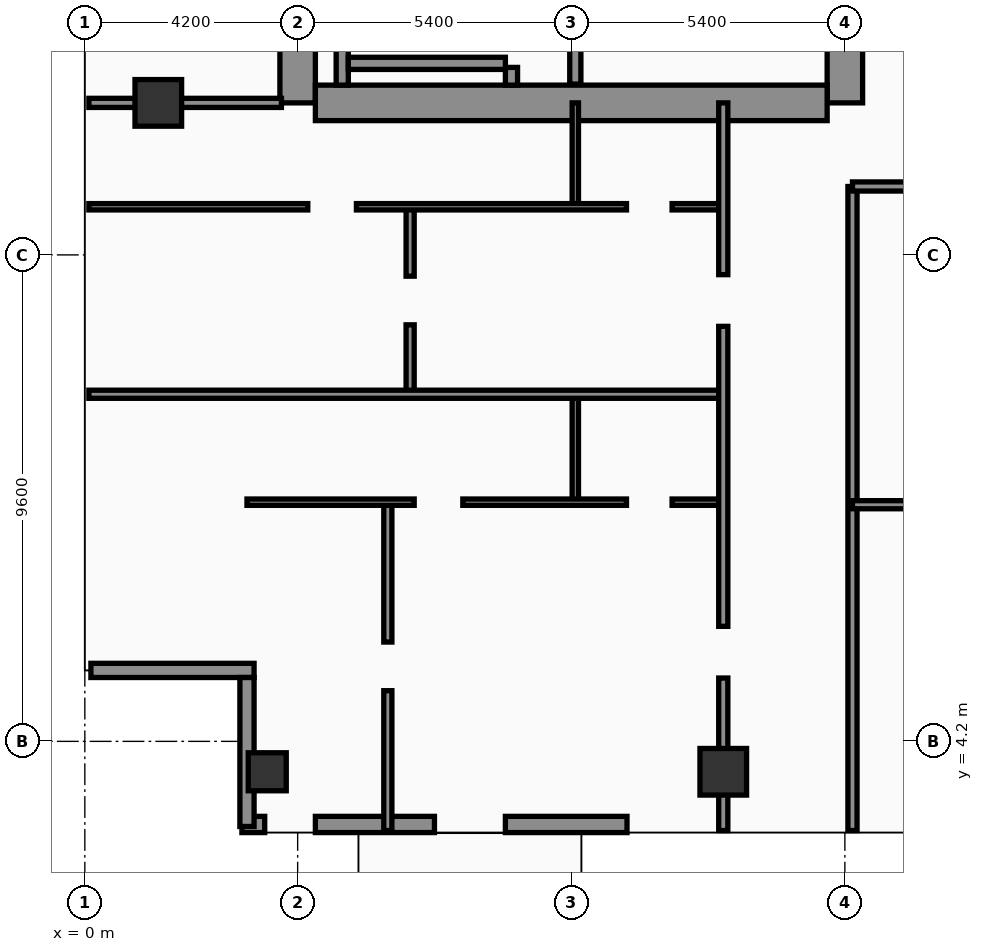
"""IFC4 building model, lengths in metres.
Left out: names, types, materials, properties, quantities, classifications, styles, units other than length and angle.
Written with IfcOpenShell. Run it as: python <this file> out.ifc"""

import sys

from ifc_helpers import new_model, si_unit, direction, frame, frame_2d, origin, origin_2d, place, context, subcontext, project, spatial, rectangle, hollow_rectangle, extrude, element, fill, save


model = new_model("IFC4")
c1 = context("Model", 3, precision=1e-05, world=origin(), true_north=direction((0.0, 1.0)))
c2 = subcontext(c1, "Body", "Model", "MODEL_VIEW")
j1 = project(units=[si_unit("LENGTHUNIT", "METRE"), si_unit("PLANEANGLEUNIT", "RADIAN")], contexts=[c1])
p1 = place(None, origin())
s1 = spatial("IfcSite", under=j1, at=p1, CompositionType="ELEMENT")
p2 = place(p1, origin())
s2 = spatial("IfcBuilding", under=s1, at=p2, CompositionType="ELEMENT")
p3 = place(p2, frame((0.0, 0.0, 211.0)))
s3 = spatial("IfcBuildingStorey", under=s2, at=p3, CompositionType="ELEMENT", Elevation=211.0)
p4 = place(p3, frame((4.2, 16.8, 0.0), z_axis=(0.0, 0.0, 1.0), x_axis=(0.0, 1.0, 0.0)))
e1 = element("IfcWall", 1, at=p4, inside=s3, PredefinedType="SHEAR", context=c2, shape_type="SweptSolid", body=[
    extrude(rectangle(XDim=21.6, YDim=0.7, at=frame_2d((10.8, 0.0))), origin(), (0.0, 0.0, 1.0), 3.56),
])
p5 = place(p3, frame((15.0, 16.8, 0.0), z_axis=(0.0, 0.0, 1.0), x_axis=(0.0, 1.0, 0.0)))
e2 = element("IfcWall", 2, at=p5, inside=s3, PredefinedType="SHEAR", context=c2, shape_type="SweptSolid", body=[
    extrude(rectangle(XDim=21.6, YDim=0.7, at=frame_2d((10.8, 0.0))), origin(), (0.0, 0.0, 1.0), 3.56),
])
p6 = place(p5, frame((8.65, 0.0, 0.0)))
e3 = element("IfcOpeningElement", 3, at=p6, cuts=e2, PredefinedType="OPENING", context=c2, shape_type="SweptSolid", body=[
    extrude(rectangle(XDim=1.1, YDim=2.2, at=frame_2d((0.55, 1.1))), frame((0.0, 0.36, 0.0), z_axis=(0.0, -1.0, 0.0), x_axis=(1.0, 0.0, 0.0)), (0.0, 0.0, 1.0), 0.72),
])
p7 = place(p5, frame((10.85, 0.0, 0.0)))
e4 = element("IfcOpeningElement", 4, at=p7, cuts=e2, PredefinedType="OPENING", context=c2, shape_type="SweptSolid", body=[
    extrude(rectangle(XDim=1.1, YDim=2.2, at=frame_2d((0.55, 1.1))), frame((0.0, 0.36, 0.0), z_axis=(0.0, -1.0, 0.0), x_axis=(1.0, 0.0, 0.0)), (0.0, 0.0, 1.0), 0.72),
])
p8 = place(p5, frame((13.5, 0.0, 0.0)))
e5 = element("IfcOpeningElement", 5, at=p8, cuts=e2, PredefinedType="OPENING", context=c2, shape_type="SweptSolid", body=[
    extrude(rectangle(XDim=1.1, YDim=2.2, at=frame_2d((0.55, 1.1))), frame((0.0, 0.36, 0.0), z_axis=(0.0, -1.0, 0.0), x_axis=(1.0, 0.0, 0.0)), (0.0, 0.0, 1.0), 0.72),
])
p9 = place(p5, frame((16.15, 0.0, 0.0)))
e6 = element("IfcOpeningElement", 6, at=p9, cuts=e2, PredefinedType="OPENING", context=c2, shape_type="SweptSolid", body=[
    extrude(rectangle(XDim=1.1, YDim=2.2, at=frame_2d((0.55, 1.1))), frame((0.0, 0.36, 0.0), z_axis=(0.0, -1.0, 0.0), x_axis=(1.0, 0.0, 0.0)), (0.0, 0.0, 1.0), 0.72),
])
p10 = place(p3, frame((4.55, 16.8, 0.0), z_axis=(0.0, 0.0, 1.0), x_axis=(1.0, 0.0, 0.0)))
e7 = element("IfcWall", 7, at=p10, inside=s3, PredefinedType="SHEAR", context=c2, shape_type="SweptSolid", body=[
    extrude(rectangle(XDim=10.1, YDim=0.7, at=frame_2d((5.05, 0.0))), origin(), (0.0, 0.0, 1.0), 3.56),
])
p11 = place(p3, frame((5.08, 17.15, 0.0), z_axis=(0.0, 0.0, 1.0), x_axis=(0.0, 1.0, 0.0)))
e8 = element("IfcWall", 8, at=p11, inside=s3, PredefinedType="SOLIDWALL", context=c2, shape_type="SweptSolid", body=[
    extrude(rectangle(XDim=9.64, YDim=0.24, at=frame_2d((4.82, 0.0))), origin(), (0.0, 0.0, 1.0), 3.56),
])
p12 = place(p3, frame((8.42, 17.15, 0.0), z_axis=(0.0, 0.0, 1.0), x_axis=(0.0, 1.0, 0.0)))
e9 = element("IfcWall", 9, at=p12, inside=s3, PredefinedType="SOLIDWALL", context=c2, shape_type="SweptSolid", body=[
    extrude(rectangle(XDim=9.64, YDim=0.24, at=frame_2d((4.82, 0.0))), origin(), (0.0, 0.0, 1.0), 3.56),
])
p13 = place(p12, frame((0.35, 0.0, 0.0)))
e10 = element("IfcOpeningElement", 10, at=p13, cuts=e9, PredefinedType="OPENING", context=c2, shape_type="SweptSolid", body=[
    extrude(rectangle(XDim=1.15, YDim=2.2, at=frame_2d((0.575, 1.1))), frame((0.0, 0.13, 0.0), z_axis=(0.0, -1.0, 0.0), x_axis=(1.0, 0.0, 0.0)), (0.0, 0.0, 1.0), 0.26),
])
p14 = place(p3, frame((5.2, 17.58, 0.0), z_axis=(0.0, 0.0, 1.0), x_axis=(1.0, 0.0, 0.0)))
e11 = element("IfcWall", 11, at=p14, inside=s3, PredefinedType="SOLIDWALL", context=c2, shape_type="SweptSolid", body=[
    extrude(rectangle(XDim=3.1, YDim=0.24, at=frame_2d((1.55, 0.0))), origin(), (0.0, 0.0, 1.0), 3.56),
])
p15 = place(p3, frame((3.6, 3.6, 0.0), z_axis=(0.0, 0.0, 1.0), x_axis=(1.0, 0.0, 0.0)))
e12 = element("IfcColumn", 12, at=p15, inside=s3, PredefinedType="COLUMN", context=c2, shape_type="SweptSolid", body=[
    extrude(hollow_rectangle(XDim=0.75, YDim=0.75, WallThickness=0.032, at=origin_2d()), origin(), (0.0, 0.0, 1.0), 3.56),
])
for number, where, z_axis, x_axis in (
    (13, (1.45, 16.8, 0.0), (0.0, 0.0, 1.0), (1.0, 0.0, 0.0)),
    (14, (12.6, 3.6, 0.0), (0.0, 0.0, 1.0), (1.0, 0.0, 0.0)),
):
    element("IfcColumn", number, at=place(p3, frame(where, z_axis=z_axis, x_axis=x_axis)), inside=s3, PredefinedType="COLUMN", context=c2, shape_type="SweptSolid", body=[
        extrude(rectangle(XDim=0.92, YDim=0.92, at=origin_2d()), origin(), (0.0, 0.0, 1.0), 3.56),
    ])
p16 = place(p3, frame((3.1, 2.56, 0.0), z_axis=(0.0, 0.0, 1.0), x_axis=(1.0, 0.0, 0.0)))
e15 = element("IfcWall", 15, at=p16, inside=s3, PredefinedType="SOLIDWALL", context=c2, shape_type="SweptSolid", body=[
    extrude(rectangle(XDim=7.6, YDim=0.32, at=frame_2d((3.8, 0.0))), origin(), (0.0, 0.0, 1.0), 3.56),
])
p17 = place(p16, frame((0.45, 0.0, 0.75)))
e16 = element("IfcOpeningElement", 16, at=p17, cuts=e15, PredefinedType="OPENING", context=c2, shape_type="SweptSolid", body=[
    extrude(rectangle(XDim=1.0, YDim=1.6, at=frame_2d((0.5, 0.8))), frame((0.0, 0.17, 0.0), z_axis=(0.0, -1.0, 0.0), x_axis=(1.0, 0.0, 0.0)), (0.0, 0.0, 1.0), 0.34),
])
p18 = place(p16, frame((3.8, 0.0, 0.0)))
e17 = element("IfcOpeningElement", 17, at=p18, cuts=e15, PredefinedType="OPENING", context=c2, shape_type="SweptSolid", body=[
    extrude(rectangle(XDim=1.4, YDim=2.25, at=frame_2d((0.7, 1.125))), frame((0.0, 0.17, 0.0), z_axis=(0.0, -1.0, 0.0), x_axis=(1.0, 0.0, 0.0)), (0.0, 0.0, 1.0), 0.34),
])
p19 = place(p3, frame((0.12, 5.6, 0.0), z_axis=(0.0, 0.0, 1.0), x_axis=(1.0, 0.0, 0.0)))
e18 = element("IfcWall", 18, at=p19, inside=s3, PredefinedType="SOLIDWALL", context=c2, shape_type="SweptSolid", body=[
    extrude(rectangle(XDim=3.22, YDim=0.28, at=frame_2d((1.61, 0.0))), origin(), (0.0, 0.0, 1.0), 2.94),
])
p20 = place(p3, frame((3.2, 5.46, 0.0), z_axis=(0.0, 0.0, 1.0), x_axis=(0.0, -1.0, 0.0)))
e19 = element("IfcWall", 19, at=p20, inside=s3, PredefinedType="SOLIDWALL", context=c2, shape_type="SweptSolid", body=[
    extrude(rectangle(XDim=2.94, YDim=0.28, at=frame_2d((1.47, 0.0))), origin(), (0.0, 0.0, 1.0), 2.94),
])
p21 = place(p3, frame((9.68, 17.17, 0.0), z_axis=(0.0, 0.0, 1.0), x_axis=(0.0, 1.0, 0.0)))
e20 = element("IfcWall", 20, at=p21, inside=s3, PredefinedType="SOLIDWALL", context=c2, shape_type="SweptSolid", body=[
    extrude(rectangle(XDim=7.83, YDim=0.22, at=frame_2d((3.915, 0.0))), origin(), (0.0, 0.0, 1.0), 3.56),
])
p22 = place(p3, frame((0.08, 16.8, 0.0), z_axis=(0.0, 0.0, 1.0), x_axis=(1.0, 0.0, 0.0)))
e21 = element("IfcWall", 21, at=p22, inside=s3, PredefinedType="PARTITIONING", context=c2, shape_type="SweptSolid", body=[
    extrude(rectangle(XDim=3.8, YDim=0.18, at=frame_2d((1.9, 0.0))), origin(), (0.0, 0.0, 1.0), 2.94),
])
p23 = place(p3, frame((9.68, 8.92, 0.0), z_axis=(0.0, 0.0, 1.0), x_axis=(0.0, 1.0, 0.0)))
e22 = element("IfcWall", 22, at=p23, inside=s3, PredefinedType="PARTITIONING", context=c2, shape_type="SweptSolid", body=[
    extrude(rectangle(XDim=2.13, YDim=0.125, at=frame_2d((1.065, 0.0))), origin(), (0.0, 0.0, 1.0), 3.09),
])
p24 = place(p3, frame((5.98, 2.44, 0.0), z_axis=(0.0, 0.0, 1.0), x_axis=(0.0, 1.0, 0.0)))
e23 = element("IfcWall", 23, at=p24, inside=s3, PredefinedType="PARTITIONING", context=c2, shape_type="SweptSolid", body=[
    extrude(rectangle(XDim=6.48, YDim=0.16, at=frame_2d((3.24, 0.0))), origin(), (0.0, 0.0, 1.0), 3.09),
])
p25 = place(p24, frame((2.76, 0.0, 0.0)))
e24 = element("IfcOpeningElement", 24, at=p25, cuts=e23, PredefinedType="OPENING", context=c2, shape_type="SweptSolid", body=[
    extrude(rectangle(XDim=0.96, YDim=2.2, at=frame_2d((0.48, 1.1))), frame((0.0, 0.09, 0.0), z_axis=(0.0, -1.0, 0.0), x_axis=(1.0, 0.0, 0.0)), (0.0, 0.0, 1.0), 0.18),
])
p26 = place(p3, frame((3.2, 8.92, 0.0), z_axis=(0.0, 0.0, 1.0), x_axis=(1.0, 0.0, 0.0)))
e25 = element("IfcWall", 25, at=p26, inside=s3, PredefinedType="PARTITIONING", context=c2, shape_type="SweptSolid", body=[
    extrude(rectangle(XDim=9.4, YDim=0.125, at=frame_2d((4.7, 0.0))), origin(), (0.0, 0.0, 1.0), 2.94),
])
p27 = place(p26, frame((3.3, 0.0, 0.0)))
e26 = element("IfcOpeningElement", 26, at=p27, cuts=e25, PredefinedType="OPENING", context=c2, shape_type="SweptSolid", body=[
    extrude(rectangle(XDim=0.96, YDim=2.2, at=frame_2d((0.48, 1.1))), frame((0.0, 0.073, 0.0), z_axis=(0.0, -1.0, 0.0), x_axis=(1.0, 0.0, 0.0)), (0.0, 0.0, 1.0), 0.145),
])
p28 = place(p26, frame((7.49, 0.0, 0.0)))
e27 = element("IfcOpeningElement", 27, at=p28, cuts=e25, PredefinedType="OPENING", context=c2, shape_type="SweptSolid", body=[
    extrude(rectangle(XDim=0.9, YDim=2.15, at=frame_2d((0.45, 1.075))), frame((0.0, 0.073, 0.0), z_axis=(0.0, -1.0, 0.0), x_axis=(1.0, 0.0, 0.0)), (0.0, 0.0, 1.0), 0.145),
])
p29 = place(p3, frame((9.68, 14.75, 0.0), z_axis=(0.0, 0.0, 1.0), x_axis=(0.0, 1.0, 0.0)))
e28 = element("IfcWall", 28, at=p29, inside=s3, PredefinedType="PARTITIONING", context=c2, shape_type="SweptSolid", body=[
    extrude(rectangle(XDim=2.05, YDim=0.125, at=frame_2d((1.025, 0.0))), origin(), (0.0, 0.0, 1.0), 3.56),
])
p30 = place(p3, frame((6.42, 11.05, 0.0), z_axis=(0.0, 0.0, 1.0), x_axis=(0.0, 1.0, 0.0)))
e29 = element("IfcWall", 29, at=p30, inside=s3, PredefinedType="PARTITIONING", context=c2, shape_type="SweptSolid", body=[
    extrude(rectangle(XDim=3.7, YDim=0.16, at=frame_2d((1.85, 0.0))), origin(), (0.0, 0.0, 1.0), 3.56),
])
p31 = place(p30, frame((1.37, 0.0, 0.0)))
e30 = element("IfcOpeningElement", 30, at=p31, cuts=e29, PredefinedType="OPENING", context=c2, shape_type="SweptSolid", body=[
    extrude(rectangle(XDim=0.96, YDim=2.2, at=frame_2d((0.48, 1.1))), frame((0.0, 0.09, 0.0), z_axis=(0.0, -1.0, 0.0), x_axis=(1.0, 0.0, 0.0)), (0.0, 0.0, 1.0), 0.18),
])
p32 = place(p3, frame((0.08, 14.75, 0.0), z_axis=(0.0, 0.0, 1.0), x_axis=(1.0, 0.0, 0.0)))
e31 = element("IfcWall", 31, at=p32, inside=s3, PredefinedType="PARTITIONING", context=c2, shape_type="SweptSolid", body=[
    extrude(rectangle(XDim=12.52, YDim=0.125, at=frame_2d((6.26, 0.0))), origin(), (0.0, 0.0, 1.0), 2.94),
])
p33 = place(p32, frame((4.32, 0.0, 0.0)))
e32 = element("IfcOpeningElement", 32, at=p33, cuts=e31, PredefinedType="OPENING", context=c2, shape_type="SweptSolid", body=[
    extrude(rectangle(XDim=0.96, YDim=2.2, at=frame_2d((0.48, 1.1))), frame((0.0, 0.073, 0.0), z_axis=(0.0, -1.0, 0.0), x_axis=(1.0, 0.0, 0.0)), (0.0, 0.0, 1.0), 0.145),
])
p34 = place(p32, frame((10.61, 0.0, 0.0)))
e33 = element("IfcOpeningElement", 33, at=p34, cuts=e31, PredefinedType="OPENING", context=c2, shape_type="SweptSolid", body=[
    extrude(rectangle(XDim=0.9, YDim=2.15, at=frame_2d((0.45, 1.075))), frame((0.0, 0.073, 0.0), z_axis=(0.0, -1.0, 0.0), x_axis=(1.0, 0.0, 0.0)), (0.0, 0.0, 1.0), 0.145),
])
p35 = place(p3, frame((0.08, 11.05, 0.0), z_axis=(0.0, 0.0, 1.0), x_axis=(1.0, 0.0, 0.0)))
e34 = element("IfcWall", 34, at=p35, inside=s3, PredefinedType="PARTITIONING", context=c2, shape_type="SweptSolid", body=[
    extrude(rectangle(XDim=12.52, YDim=0.16, at=frame_2d((6.26, 0.0))), origin(), (0.0, 0.0, 1.0), 2.94),
])
p36 = place(p3, frame((12.6, 2.44, 0.0), z_axis=(0.0, 0.0, 1.0), x_axis=(0.0, 1.0, 0.0)))
e35 = element("IfcWall", 35, at=p36, inside=s3, PredefinedType="PARTITIONING", context=c2, shape_type="SweptSolid", body=[
    extrude(rectangle(XDim=14.36, YDim=0.18, at=frame_2d((7.18, 0.0))), origin(), (0.0, 0.0, 1.0), 2.94),
])
p37 = place(p36, frame((3.01, 0.0, 0.0)))
e36 = element("IfcOpeningElement", 36, at=p37, cuts=e35, PredefinedType="OPENING", context=c2, shape_type="SweptSolid", body=[
    extrude(rectangle(XDim=1.02, YDim=2.2, at=frame_2d((0.51, 1.1))), frame((0.0, 0.1, 0.0), z_axis=(0.0, -1.0, 0.0), x_axis=(1.0, 0.0, 0.0)), (0.0, 0.0, 1.0), 0.2),
])
p38 = place(p36, frame((9.95, 0.0, 0.0)))
e37 = element("IfcOpeningElement", 37, at=p38, cuts=e35, PredefinedType="OPENING", context=c2, shape_type="SweptSolid", body=[
    extrude(rectangle(XDim=1.02, YDim=2.2, at=frame_2d((0.51, 1.1))), frame((0.0, 0.1, 0.0), z_axis=(0.0, -1.0, 0.0), x_axis=(1.0, 0.0, 0.0)), (0.0, 0.0, 1.0), 0.2),
])
p39 = place(p3, frame((15.15, 2.44, 0.0), z_axis=(0.0, 0.0, 1.0), x_axis=(0.0, 1.0, 0.0)))
e38 = element("IfcWall", 38, at=p39, inside=s3, PredefinedType="PARTITIONING", context=c2, shape_type="SweptSolid", body=[
    extrude(rectangle(XDim=12.71, YDim=0.18, at=frame_2d((6.355, 0.0))), origin(), (0.0, 0.0, 1.0), 3.09),
])
p40 = place(p3, frame((15.15, 8.87, 0.0), z_axis=(0.0, 0.0, 1.0), x_axis=(1.0, 0.0, 0.0)))
e39 = element("IfcWall", 39, at=p40, inside=s3, PredefinedType="PARTITIONING", context=c2, shape_type="SweptSolid", body=[
    extrude(rectangle(XDim=4.45, YDim=0.16, at=frame_2d((2.225, 0.0))), origin(), (0.0, 0.0, 1.0), 3.56),
])
p41 = place(p40, frame((1.75, 0.0, 0.0)))
e40 = element("IfcOpeningElement", 40, at=p41, cuts=e39, PredefinedType="OPENING", context=c2, shape_type="SweptSolid", body=[
    extrude(rectangle(XDim=0.96, YDim=2.2, at=frame_2d((0.48, 1.1))), frame((0.0, 0.09, 0.0), z_axis=(0.0, -1.0, 0.0), x_axis=(1.0, 0.0, 0.0)), (0.0, 0.0, 1.0), 0.18),
])
p42 = place(p3, frame((15.15, 15.15, 0.0), z_axis=(0.0, 0.0, 1.0), x_axis=(1.0, 0.0, 0.0)))
e41 = element("IfcWall", 41, at=p42, inside=s3, PredefinedType="PARTITIONING", context=c2, shape_type="SweptSolid", body=[
    extrude(rectangle(XDim=6.45, YDim=0.18, at=frame_2d((3.225, 0.0))), origin(), (0.0, 0.0, 1.0), 2.59),
])
p43 = place(p42, frame((1.74, 0.0, 0.0)))
e42 = element("IfcOpeningElement", 42, at=p43, cuts=e41, PredefinedType="OPENING", context=c2, shape_type="SweptSolid", body=[
    extrude(rectangle(XDim=1.02, YDim=2.2, at=frame_2d((0.51, 1.1))), frame((0.0, 0.1, 0.0), z_axis=(0.0, -1.0, 0.0), x_axis=(1.0, 0.0, 0.0)), (0.0, 0.0, 1.0), 0.2),
])
p44 = place(p17, origin())
e43 = element("IfcWindow", 43, at=p44, inside=s3, PartitioningType="SINGLE_PANEL", PredefinedType="WINDOW", context=c2, shape_type="SweptSolid", body=[
    extrude(rectangle(XDim=1.0, YDim=1.6, at=frame_2d((0.5, 0.8))), frame((0.0, 0.03, 0.0), z_axis=(0.0, -1.0, 0.0), x_axis=(1.0, 0.0, 0.0)), (0.0, 0.0, 1.0), 0.06),
])
fill(e16, e43)
p45 = place(p18, origin())
e44 = element("IfcDoor", 44, at=p45, inside=s3, OperationType="SINGLE_SWING_LEFT", PredefinedType="DOOR", context=c2, shape_type="SweptSolid", body=[
    extrude(rectangle(XDim=1.4, YDim=2.25, at=frame_2d((0.7, 1.125))), frame((0.0, 0.025, 0.0), z_axis=(0.0, -1.0, 0.0), x_axis=(1.0, 0.0, 0.0)), (0.0, 0.0, 1.0), 0.05),
])
fill(e17, e44)
p46 = place(p25, origin())
e45 = element("IfcDoor", 45, at=p46, inside=s3, OperationType="SINGLE_SWING_LEFT", PredefinedType="DOOR", context=c2, shape_type="SweptSolid", body=[
    extrude(rectangle(XDim=0.96, YDim=2.2, at=frame_2d((0.48, 1.1))), frame((0.0, 0.025, 0.0), z_axis=(0.0, -1.0, 0.0), x_axis=(1.0, 0.0, 0.0)), (0.0, 0.0, 1.0), 0.05),
])
fill(e24, e45)
p47 = place(p27, origin())
e46 = element("IfcDoor", 46, at=p47, inside=s3, OperationType="SINGLE_SWING_LEFT", PredefinedType="DOOR", context=c2, shape_type="SweptSolid", body=[
    extrude(rectangle(XDim=0.96, YDim=2.2, at=frame_2d((0.48, 1.1))), frame((0.0, 0.025, 0.0), z_axis=(0.0, -1.0, 0.0), x_axis=(1.0, 0.0, 0.0)), (0.0, 0.0, 1.0), 0.05),
])
fill(e26, e46)
p48 = place(p28, origin())
e47 = element("IfcDoor", 47, at=p48, inside=s3, OperationType="SINGLE_SWING_RIGHT", PredefinedType="DOOR", context=c2, shape_type="SweptSolid", body=[
    extrude(rectangle(XDim=0.9, YDim=2.15, at=frame_2d((0.45, 1.075))), frame((0.0, 0.025, 0.0), z_axis=(0.0, -1.0, 0.0), x_axis=(1.0, 0.0, 0.0)), (0.0, 0.0, 1.0), 0.05),
])
fill(e27, e47)
p49 = place(p31, origin())
e48 = element("IfcDoor", 48, at=p49, inside=s3, OperationType="SINGLE_SWING_LEFT", PredefinedType="DOOR", context=c2, shape_type="SweptSolid", body=[
    extrude(rectangle(XDim=0.96, YDim=2.2, at=frame_2d((0.48, 1.1))), frame((0.0, 0.025, 0.0), z_axis=(0.0, -1.0, 0.0), x_axis=(1.0, 0.0, 0.0)), (0.0, 0.0, 1.0), 0.05),
])
fill(e30, e48)
p50 = place(p33, origin())
e49 = element("IfcDoor", 49, at=p50, inside=s3, OperationType="SINGLE_SWING_LEFT", PredefinedType="DOOR", context=c2, shape_type="SweptSolid", body=[
    extrude(rectangle(XDim=0.96, YDim=2.2, at=frame_2d((0.48, 1.1))), frame((0.0, 0.025, 0.0), z_axis=(0.0, -1.0, 0.0), x_axis=(1.0, 0.0, 0.0)), (0.0, 0.0, 1.0), 0.05),
])
fill(e32, e49)
p51 = place(p34, origin())
e50 = element("IfcDoor", 50, at=p51, inside=s3, OperationType="SINGLE_SWING_RIGHT", PredefinedType="DOOR", context=c2, shape_type="SweptSolid", body=[
    extrude(rectangle(XDim=0.9, YDim=2.15, at=frame_2d((0.45, 1.075))), frame((0.0, 0.025, 0.0), z_axis=(0.0, -1.0, 0.0), x_axis=(1.0, 0.0, 0.0)), (0.0, 0.0, 1.0), 0.05),
])
fill(e33, e50)
p52 = place(p37, origin())
e51 = element("IfcDoor", 51, at=p52, inside=s3, OperationType="SINGLE_SWING_LEFT", PredefinedType="DOOR", context=c2, shape_type="SweptSolid", body=[
    extrude(rectangle(XDim=1.02, YDim=2.2, at=frame_2d((0.51, 1.1))), frame((0.0, 0.025, 0.0), z_axis=(0.0, -1.0, 0.0), x_axis=(1.0, 0.0, 0.0)), (0.0, 0.0, 1.0), 0.05),
])
fill(e36, e51)
p53 = place(p38, origin())
e52 = element("IfcDoor", 52, at=p53, inside=s3, OperationType="SINGLE_SWING_RIGHT", PredefinedType="DOOR", context=c2, shape_type="SweptSolid", body=[
    extrude(rectangle(XDim=1.02, YDim=2.2, at=frame_2d((0.51, 1.1))), frame((0.0, 0.025, 0.0), z_axis=(0.0, -1.0, 0.0), x_axis=(1.0, 0.0, 0.0)), (0.0, 0.0, 1.0), 0.05),
])
fill(e37, e52)
p54 = place(p13, origin())
e53 = element("IfcDoor", 53, at=p54, inside=s3, OperationType="SINGLE_SWING_LEFT", PredefinedType="DOOR", context=c2, shape_type="SweptSolid", body=[
    extrude(rectangle(XDim=1.15, YDim=2.2, at=frame_2d((0.575, 1.1))), frame((0.0, 0.025, 0.0), z_axis=(0.0, -1.0, 0.0), x_axis=(1.0, 0.0, 0.0)), (0.0, 0.0, 1.0), 0.05),
])
fill(e10, e53)
save(model, sys.argv[1])
